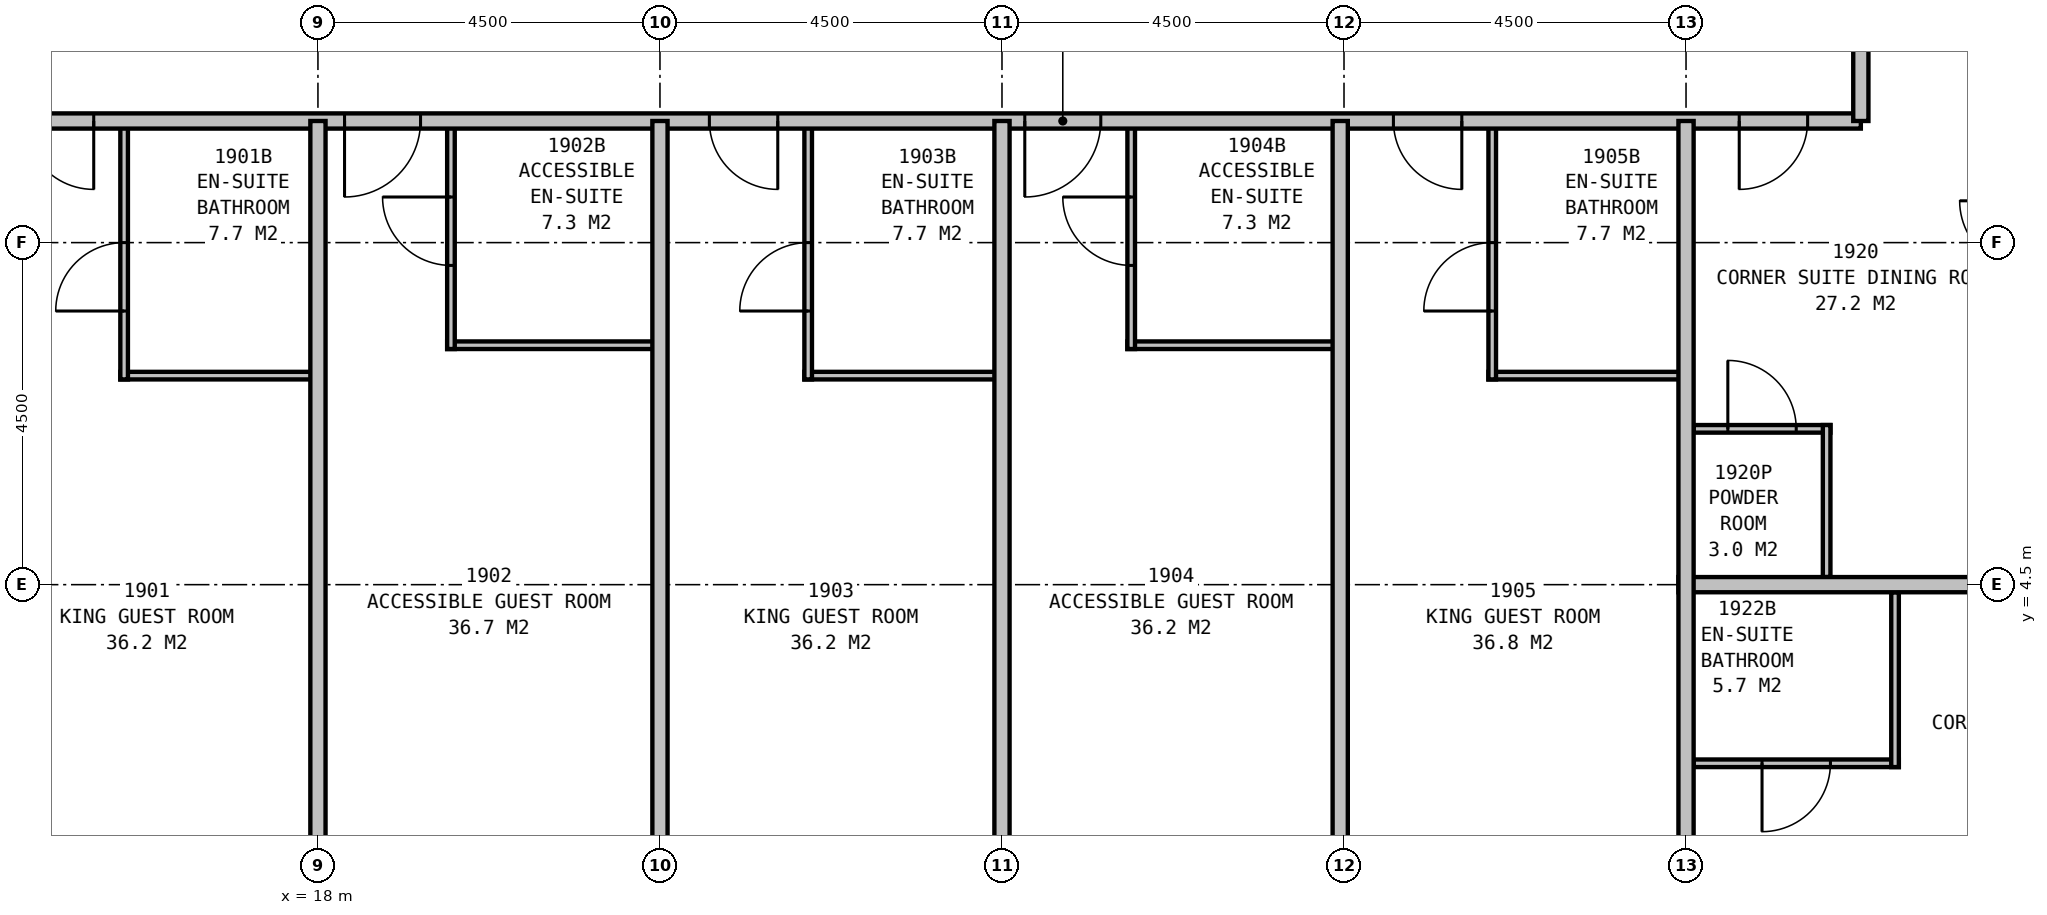
"""IFC4 building model, lengths in metres.
Left out: names, types, materials, properties, quantities, classifications, styles, units other than length and angle.
Written with IfcOpenShell. Run it as: python <this file> out.ifc"""

import sys

from ifc_helpers import new_model, si_unit, direction, frame, frame_2d, origin, place, context, subcontext, project, spatial, rectangle, extrude, element, fill, save


model = new_model("IFC4")
c1 = context("Model", 3, precision=1e-05, world=origin(), true_north=direction((0.0, 1.0)))
c2 = subcontext(c1, "Body", "Model", "MODEL_VIEW")
j1 = project(units=[si_unit("LENGTHUNIT", "METRE"), si_unit("PLANEANGLEUNIT", "RADIAN")], contexts=[c1])
p1 = place(None, origin())
s1 = spatial("IfcSite", under=j1, at=p1, CompositionType="ELEMENT")
p2 = place(p1, origin())
s2 = spatial("IfcBuilding", under=s1, at=p2, CompositionType="ELEMENT")
p3 = place(p2, frame((0.0, 0.0, 78.7)))
s3 = spatial("IfcBuildingStorey", under=s2, at=p3, CompositionType="ELEMENT", Elevation=78.7)
p4 = place(p3, frame((11.2, 10.6, 0.0), z_axis=(0.0, 0.0, 1.0), x_axis=(1.0, 0.0, 0.0)))
e1 = element("IfcWall", 1, at=p4, inside=s3, PredefinedType="PARTITIONING", context=c2, shape_type="SweptSolid", body=[
    extrude(rectangle(XDim=27.1, YDim=0.2, at=frame_2d((13.55, 0.0))), origin(), (0.0, 0.0, 1.0), 3.25),
])
p5 = place(p4, frame((3.85, 0.0, 0.0), z_axis=(0.0, 0.0, 1.0), x_axis=(-1.0, 0.0, 0.0)))
e2 = element("IfcOpeningElement", 2, at=p5, cuts=e1, PredefinedType="OPENING", context=c2, shape_type="SweptSolid", body=[
    extrude(rectangle(XDim=0.9, YDim=2.1, at=frame_2d((0.45, 1.05))), frame((0.0, 0.11, 0.0), z_axis=(0.0, -1.0, 0.0), x_axis=(1.0, 0.0, 0.0)), (0.0, 0.0, 1.0), 0.22),
])
p6 = place(p4, frame((8.15, 0.0, 0.0), z_axis=(0.0, 0.0, 1.0), x_axis=(-1.0, 0.0, 0.0)))
e3 = element("IfcOpeningElement", 3, at=p6, cuts=e1, PredefinedType="OPENING", context=c2, shape_type="SweptSolid", body=[
    extrude(rectangle(XDim=1.0, YDim=2.1, at=frame_2d((0.5, 1.05))), frame((0.0, 0.11, 0.0), z_axis=(0.0, -1.0, 0.0), x_axis=(1.0, 0.0, 0.0)), (0.0, 0.0, 1.0), 0.22),
])
p7 = place(p4, frame((12.85, 0.0, 0.0), z_axis=(0.0, 0.0, 1.0), x_axis=(-1.0, 0.0, 0.0)))
e4 = element("IfcOpeningElement", 4, at=p7, cuts=e1, PredefinedType="OPENING", context=c2, shape_type="SweptSolid", body=[
    extrude(rectangle(XDim=0.9, YDim=2.1, at=frame_2d((0.45, 1.05))), frame((0.0, 0.11, 0.0), z_axis=(0.0, -1.0, 0.0), x_axis=(1.0, 0.0, 0.0)), (0.0, 0.0, 1.0), 0.22),
])
p8 = place(p4, frame((17.1, 0.0, 0.0), z_axis=(0.0, 0.0, 1.0), x_axis=(-1.0, 0.0, 0.0)))
e5 = element("IfcOpeningElement", 5, at=p8, cuts=e1, PredefinedType="OPENING", context=c2, shape_type="SweptSolid", body=[
    extrude(rectangle(XDim=1.0, YDim=2.1, at=frame_2d((0.5, 1.05))), frame((0.0, 0.11, 0.0), z_axis=(0.0, -1.0, 0.0), x_axis=(1.0, 0.0, 0.0)), (0.0, 0.0, 1.0), 0.22),
])
p9 = place(p4, frame((21.85, 0.0, 0.0), z_axis=(0.0, 0.0, 1.0), x_axis=(-1.0, 0.0, 0.0)))
e6 = element("IfcOpeningElement", 6, at=p9, cuts=e1, PredefinedType="OPENING", context=c2, shape_type="SweptSolid", body=[
    extrude(rectangle(XDim=0.9, YDim=2.1, at=frame_2d((0.45, 1.05))), frame((0.0, 0.11, 0.0), z_axis=(0.0, -1.0, 0.0), x_axis=(1.0, 0.0, 0.0)), (0.0, 0.0, 1.0), 0.22),
])
p10 = place(p4, frame((1.6, 0.0, 0.0), z_axis=(0.0, 0.0, 1.0), x_axis=(-1.0, 0.0, 0.0)))
e7 = element("IfcOpeningElement", 7, at=p10, cuts=e1, PredefinedType="OPENING", context=c2, shape_type="SweptSolid", body=[
    extrude(rectangle(XDim=0.9, YDim=2.1, at=frame_2d((0.45, 1.05))), frame((0.0, 0.11, 0.0), z_axis=(0.0, -1.0, 0.0), x_axis=(1.0, 0.0, 0.0)), (0.0, 0.0, 1.0), 0.22),
])
p11 = place(p4, frame((26.4, 0.0, 0.0), z_axis=(0.0, 0.0, 1.0), x_axis=(-1.0, 0.0, 0.0)))
e8 = element("IfcOpeningElement", 8, at=p11, cuts=e1, PredefinedType="OPENING", context=c2, shape_type="SweptSolid", body=[
    extrude(rectangle(XDim=0.9, YDim=2.1, at=frame_2d((0.45, 1.05))), frame((0.0, 0.11, 0.0), z_axis=(0.0, -1.0, 0.0), x_axis=(1.0, 0.0, 0.0)), (0.0, 0.0, 1.0), 0.22),
])
p12 = place(p3, frame((38.3, 10.6, 0.0), z_axis=(0.0, 0.0, 1.0), x_axis=(0.0, 1.0, 0.0)))
e9 = element("IfcWall", 9, at=p12, inside=s3, PredefinedType="PARTITIONING", context=c2, shape_type="SweptSolid", body=[
    extrude(rectangle(XDim=18.7, YDim=0.2, at=frame_2d((9.35, 0.0))), origin(), (0.0, 0.0, 1.0), 3.25),
])
p13 = place(p12, frame((6.75, 0.0, 0.0), z_axis=(0.0, 0.0, 1.0), x_axis=(-1.0, 0.0, 0.0)))
e10 = element("IfcOpeningElement", 10, at=p13, cuts=e9, PredefinedType="OPENING", context=c2, shape_type="SweptSolid", body=[
    extrude(rectangle(XDim=0.9, YDim=2.1, at=frame_2d((0.45, 1.05))), frame((0.0, 0.11, 0.0), z_axis=(0.0, -1.0, 0.0), x_axis=(1.0, 0.0, 0.0)), (0.0, 0.0, 1.0), 0.22),
])
p14 = place(p12, frame((9.85, 0.0, 0.0), z_axis=(0.0, 0.0, 1.0), x_axis=(-1.0, 0.0, 0.0)))
e11 = element("IfcOpeningElement", 11, at=p14, cuts=e9, PredefinedType="OPENING", context=c2, shape_type="SweptSolid", body=[
    extrude(rectangle(XDim=1.0, YDim=2.1, at=frame_2d((0.5, 1.05))), frame((0.0, 0.11, 0.0), z_axis=(0.0, -1.0, 0.0), x_axis=(1.0, 0.0, 0.0)), (0.0, 0.0, 1.0), 0.22),
])
p15 = place(p12, frame((15.65, 0.0, 0.0), z_axis=(0.0, 0.0, 1.0), x_axis=(-1.0, 0.0, 0.0)))
e12 = element("IfcOpeningElement", 12, at=p15, cuts=e9, PredefinedType="OPENING", context=c2, shape_type="SweptSolid", body=[
    extrude(rectangle(XDim=1.0, YDim=2.1, at=frame_2d((0.5, 1.05))), frame((0.0, 0.11, 0.0), z_axis=(0.0, -1.0, 0.0), x_axis=(1.0, 0.0, 0.0)), (0.0, 0.0, 1.0), 0.22),
])
for number, where, z_axis, x_axis in (
    (13, (18.0, 10.6, 0.0), (0.0, 0.0, 1.0), (0.0, -1.0, 0.0)),
    (14, (22.5, 10.6, 0.0), (0.0, 0.0, 1.0), (0.0, -1.0, 0.0)),
    (15, (27.0, 10.6, 0.0), (0.0, 0.0, 1.0), (0.0, -1.0, 0.0)),
    (16, (31.45, 10.6, 0.0), (0.0, 0.0, 1.0), (0.0, -1.0, 0.0)),
):
    element("IfcWall", number, at=place(p3, frame(where, z_axis=z_axis, x_axis=x_axis)), inside=s3, PredefinedType="PARTITIONING", context=c2, shape_type="SweptSolid", body=[
        extrude(rectangle(XDim=10.6, YDim=0.2, at=frame_2d((5.3, 0.0))), origin(), (0.0, 0.0, 1.0), 2.25),
    ])
p16 = place(p3, frame((15.4, 7.25, 0.0), z_axis=(0.0, 0.0, 1.0), x_axis=(1.0, 0.0, 0.0)))
e17 = element("IfcWall", 17, at=p16, inside=s3, PredefinedType="PLUMBINGWALL", context=c2, shape_type="SweptSolid", body=[
    extrude(rectangle(XDim=2.6, YDim=0.1, at=frame_2d((1.3, 0.0))), origin(), (0.0, 0.0, 1.0), 3.25),
])
p17 = place(p3, frame((15.45, 10.6, 0.0), z_axis=(0.0, 0.0, 1.0), x_axis=(0.0, -1.0, 0.0)))
e18 = element("IfcWall", 18, at=p17, inside=s3, PredefinedType="PLUMBINGWALL", context=c2, shape_type="SweptSolid", body=[
    extrude(rectangle(XDim=3.4, YDim=0.1, at=frame_2d((1.7, 0.0))), origin(), (0.0, 0.0, 1.0), 3.25),
])
p18 = place(p17, frame((2.5, 0.0, 0.0), z_axis=(0.0, 0.0, 1.0), x_axis=(-1.0, 0.0, 0.0)))
e19 = element("IfcOpeningElement", 19, at=p18, cuts=e18, PredefinedType="OPENING", context=c2, shape_type="SweptSolid", body=[
    extrude(rectangle(XDim=0.9, YDim=2.1, at=frame_2d((0.45, 1.05))), frame((0.0, 0.06, 0.0), z_axis=(0.0, -1.0, 0.0), x_axis=(1.0, 0.0, 0.0)), (0.0, 0.0, 1.0), 0.12),
])
p19 = place(p3, frame((19.7, 7.65, 0.0), z_axis=(0.0, 0.0, 1.0), x_axis=(1.0, 0.0, 0.0)))
e20 = element("IfcWall", 20, at=p19, inside=s3, PredefinedType="PLUMBINGWALL", context=c2, shape_type="SweptSolid", body=[
    extrude(rectangle(XDim=2.8, YDim=0.1, at=frame_2d((1.4, 0.0))), origin(), (0.0, 0.0, 1.0), 3.25),
])
p20 = place(p3, frame((19.75, 10.6, 0.0), z_axis=(0.0, 0.0, 1.0), x_axis=(0.0, -1.0, 0.0)))
e21 = element("IfcWall", 21, at=p20, inside=s3, PredefinedType="PLUMBINGWALL", context=c2, shape_type="SweptSolid", body=[
    extrude(rectangle(XDim=3.0, YDim=0.1, at=frame_2d((1.5, 0.0))), origin(), (0.0, 0.0, 1.0), 3.25),
])
p21 = place(p20, frame((1.9, 0.0, 0.0), z_axis=(0.0, 0.0, 1.0), x_axis=(-1.0, 0.0, 0.0)))
e22 = element("IfcOpeningElement", 22, at=p21, cuts=e21, PredefinedType="OPENING", context=c2, shape_type="SweptSolid", body=[
    extrude(rectangle(XDim=0.9, YDim=2.1, at=frame_2d((0.45, 1.05))), frame((0.0, 0.06, 0.0), z_axis=(0.0, -1.0, 0.0), x_axis=(1.0, 0.0, 0.0)), (0.0, 0.0, 1.0), 0.12),
])
p22 = place(p3, frame((24.4, 7.25, 0.0), z_axis=(0.0, 0.0, 1.0), x_axis=(1.0, 0.0, 0.0)))
e23 = element("IfcWall", 23, at=p22, inside=s3, PredefinedType="PLUMBINGWALL", context=c2, shape_type="SweptSolid", body=[
    extrude(rectangle(XDim=2.6, YDim=0.1, at=frame_2d((1.3, 0.0))), origin(), (0.0, 0.0, 1.0), 3.25),
])
p23 = place(p3, frame((24.45, 10.6, 0.0), z_axis=(0.0, 0.0, 1.0), x_axis=(0.0, -1.0, 0.0)))
e24 = element("IfcWall", 24, at=p23, inside=s3, PredefinedType="PLUMBINGWALL", context=c2, shape_type="SweptSolid", body=[
    extrude(rectangle(XDim=3.4, YDim=0.1, at=frame_2d((1.7, 0.0))), origin(), (0.0, 0.0, 1.0), 3.25),
])
p24 = place(p23, frame((2.5, 0.0, 0.0), z_axis=(0.0, 0.0, 1.0), x_axis=(-1.0, 0.0, 0.0)))
e25 = element("IfcOpeningElement", 25, at=p24, cuts=e24, PredefinedType="OPENING", context=c2, shape_type="SweptSolid", body=[
    extrude(rectangle(XDim=0.9, YDim=2.1, at=frame_2d((0.45, 1.05))), frame((0.0, 0.06, 0.0), z_axis=(0.0, -1.0, 0.0), x_axis=(1.0, 0.0, 0.0)), (0.0, 0.0, 1.0), 0.12),
])
p25 = place(p3, frame((28.65, 7.65, 0.0), z_axis=(0.0, 0.0, 1.0), x_axis=(1.0, 0.0, 0.0)))
e26 = element("IfcWall", 26, at=p25, inside=s3, PredefinedType="PLUMBINGWALL", context=c2, shape_type="SweptSolid", body=[
    extrude(rectangle(XDim=2.8, YDim=0.1, at=frame_2d((1.4, 0.0))), origin(), (0.0, 0.0, 1.0), 3.25),
])
p26 = place(p3, frame((28.7, 10.6, 0.0), z_axis=(0.0, 0.0, 1.0), x_axis=(0.0, -1.0, 0.0)))
e27 = element("IfcWall", 27, at=p26, inside=s3, PredefinedType="PLUMBINGWALL", context=c2, shape_type="SweptSolid", body=[
    extrude(rectangle(XDim=3.0, YDim=0.1, at=frame_2d((1.5, 0.0))), origin(), (0.0, 0.0, 1.0), 3.25),
])
p27 = place(p26, frame((1.9, 0.0, 0.0), z_axis=(0.0, 0.0, 1.0), x_axis=(-1.0, 0.0, 0.0)))
e28 = element("IfcOpeningElement", 28, at=p27, cuts=e27, PredefinedType="OPENING", context=c2, shape_type="SweptSolid", body=[
    extrude(rectangle(XDim=0.9, YDim=2.1, at=frame_2d((0.45, 1.05))), frame((0.0, 0.06, 0.0), z_axis=(0.0, -1.0, 0.0), x_axis=(1.0, 0.0, 0.0)), (0.0, 0.0, 1.0), 0.12),
])
p28 = place(p3, frame((33.4, 7.25, 0.0), z_axis=(0.0, 0.0, 1.0), x_axis=(1.0, 0.0, 0.0)))
e29 = element("IfcWall", 29, at=p28, inside=s3, PredefinedType="PLUMBINGWALL", context=c2, shape_type="SweptSolid", body=[
    extrude(rectangle(XDim=2.6, YDim=0.1, at=frame_2d((1.3, 0.0))), origin(), (0.0, 0.0, 1.0), 3.25),
])
p29 = place(p3, frame((33.45, 10.6, 0.0), z_axis=(0.0, 0.0, 1.0), x_axis=(0.0, -1.0, 0.0)))
e30 = element("IfcWall", 30, at=p29, inside=s3, PredefinedType="PLUMBINGWALL", context=c2, shape_type="SweptSolid", body=[
    extrude(rectangle(XDim=3.4, YDim=0.1, at=frame_2d((1.7, 0.0))), origin(), (0.0, 0.0, 1.0), 3.25),
])
p30 = place(p29, frame((2.5, 0.0, 0.0), z_axis=(0.0, 0.0, 1.0), x_axis=(-1.0, 0.0, 0.0)))
e31 = element("IfcOpeningElement", 31, at=p30, cuts=e30, PredefinedType="OPENING", context=c2, shape_type="SweptSolid", body=[
    extrude(rectangle(XDim=0.9, YDim=2.1, at=frame_2d((0.45, 1.05))), frame((0.0, 0.06, 0.0), z_axis=(0.0, -1.0, 0.0), x_axis=(1.0, 0.0, 0.0)), (0.0, 0.0, 1.0), 0.12),
])
p31 = place(p3, frame((36.0, 10.6, 0.0), z_axis=(0.0, 0.0, 1.0), x_axis=(0.0, -1.0, 0.0)))
e32 = element("IfcWall", 32, at=p31, inside=s3, PredefinedType="PARTITIONING", context=c2, shape_type="SweptSolid", body=[
    extrude(rectangle(XDim=10.6, YDim=0.2, at=frame_2d((5.3, 0.0))), origin(), (0.0, 0.0, 1.0), 2.25),
])
p32 = place(p3, frame((35.9, 4.5, 0.0), z_axis=(0.0, 0.0, 1.0), x_axis=(1.0, 0.0, 0.0)))
e33 = element("IfcWall", 33, at=p32, inside=s3, PredefinedType="PARTITIONING", context=c2, shape_type="SweptSolid", body=[
    extrude(rectangle(XDim=9.1, YDim=0.2, at=frame_2d((4.55, 0.0))), origin(), (0.0, 0.0, 1.0), 3.25),
])
p33 = place(p32, frame((7.1, 0.0, 0.0)))
e34 = element("IfcOpeningElement", 34, at=p33, cuts=e33, PredefinedType="OPENING", context=c2, shape_type="SweptSolid", body=[
    extrude(rectangle(XDim=0.9, YDim=2.1, at=frame_2d((0.45, 1.05))), frame((0.0, 0.11, 0.0), z_axis=(0.0, -1.0, 0.0), x_axis=(1.0, 0.0, 0.0)), (0.0, 0.0, 1.0), 0.22),
])
p34 = place(p3, frame((37.85, 4.6, 0.0), z_axis=(0.0, 0.0, 1.0), x_axis=(0.0, 1.0, 0.0)))
e35 = element("IfcWall", 35, at=p34, inside=s3, PredefinedType="PLUMBINGWALL", context=c2, shape_type="SweptSolid", body=[
    extrude(rectangle(XDim=2.0, YDim=0.1, at=frame_2d((1.0, 0.0))), origin(), (0.0, 0.0, 1.0), 3.25),
])
p35 = place(p3, frame((36.1, 6.55, 0.0), z_axis=(0.0, 0.0, 1.0), x_axis=(1.0, 0.0, 0.0)))
e36 = element("IfcWall", 36, at=p35, inside=s3, PredefinedType="PLUMBINGWALL", context=c2, shape_type="SweptSolid", body=[
    extrude(rectangle(XDim=1.8, YDim=0.1, at=frame_2d((0.9, 0.0))), origin(), (0.0, 0.0, 1.0), 3.25),
])
p36 = place(p35, frame((0.45, 0.0, 0.0)))
e37 = element("IfcOpeningElement", 37, at=p36, cuts=e36, PredefinedType="OPENING", context=c2, shape_type="SweptSolid", body=[
    extrude(rectangle(XDim=0.9, YDim=2.1, at=frame_2d((0.45, 1.05))), frame((0.0, 0.06, 0.0), z_axis=(0.0, -1.0, 0.0), x_axis=(1.0, 0.0, 0.0)), (0.0, 0.0, 1.0), 0.12),
])
p37 = place(p3, frame((38.75, 4.4, 0.0), z_axis=(0.0, 0.0, 1.0), x_axis=(0.0, -1.0, 0.0)))
e38 = element("IfcWall", 38, at=p37, inside=s3, PredefinedType="PLUMBINGWALL", context=c2, shape_type="SweptSolid", body=[
    extrude(rectangle(XDim=2.3, YDim=0.1, at=frame_2d((1.15, 0.0))), origin(), (0.0, 0.0, 1.0), 3.25),
])
p38 = place(p3, frame((36.1, 2.15, 0.0), z_axis=(0.0, 0.0, 1.0), x_axis=(1.0, 0.0, 0.0)))
e39 = element("IfcWall", 39, at=p38, inside=s3, PredefinedType="PLUMBINGWALL", context=c2, shape_type="SweptSolid", body=[
    extrude(rectangle(XDim=2.7, YDim=0.1, at=frame_2d((1.35, 0.0))), origin(), (0.0, 0.0, 1.0), 3.25),
])
p39 = place(p38, frame((1.8, 0.0, 0.0), z_axis=(0.0, 0.0, 1.0), x_axis=(-1.0, 0.0, 0.0)))
e40 = element("IfcOpeningElement", 40, at=p39, cuts=e39, PredefinedType="OPENING", context=c2, shape_type="SweptSolid", body=[
    extrude(rectangle(XDim=0.9, YDim=2.1, at=frame_2d((0.45, 1.05))), frame((0.0, 0.06, 0.0), z_axis=(0.0, -1.0, 0.0), x_axis=(1.0, 0.0, 0.0)), (0.0, 0.0, 1.0), 0.12),
])
p40 = place(p5, origin())
e41 = element("IfcDoor", 41, at=p40, inside=s3, OperationType="SINGLE_SWING_LEFT", PredefinedType="DOOR", context=c2, shape_type="SweptSolid", body=[
    extrude(rectangle(XDim=0.9, YDim=2.1, at=frame_2d((0.45, 1.05))), frame((0.0, 0.025, 0.0), z_axis=(0.0, -1.0, 0.0), x_axis=(1.0, 0.0, 0.0)), (0.0, 0.0, 1.0), 0.05),
])
fill(e2, e41)
p41 = place(p6, origin())
e42 = element("IfcDoor", 42, at=p41, inside=s3, OperationType="SINGLE_SWING_RIGHT", PredefinedType="DOOR", context=c2, shape_type="SweptSolid", body=[
    extrude(rectangle(XDim=1.0, YDim=2.1, at=frame_2d((0.5, 1.05))), frame((0.0, 0.025, 0.0), z_axis=(0.0, -1.0, 0.0), x_axis=(1.0, 0.0, 0.0)), (0.0, 0.0, 1.0), 0.05),
])
fill(e3, e42)
p42 = place(p7, origin())
e43 = element("IfcDoor", 43, at=p42, inside=s3, OperationType="SINGLE_SWING_LEFT", PredefinedType="DOOR", context=c2, shape_type="SweptSolid", body=[
    extrude(rectangle(XDim=0.9, YDim=2.1, at=frame_2d((0.45, 1.05))), frame((0.0, 0.025, 0.0), z_axis=(0.0, -1.0, 0.0), x_axis=(1.0, 0.0, 0.0)), (0.0, 0.0, 1.0), 0.05),
])
fill(e4, e43)
p43 = place(p8, origin())
e44 = element("IfcDoor", 44, at=p43, inside=s3, OperationType="SINGLE_SWING_RIGHT", PredefinedType="DOOR", context=c2, shape_type="SweptSolid", body=[
    extrude(rectangle(XDim=1.0, YDim=2.1, at=frame_2d((0.5, 1.05))), frame((0.0, 0.025, 0.0), z_axis=(0.0, -1.0, 0.0), x_axis=(1.0, 0.0, 0.0)), (0.0, 0.0, 1.0), 0.05),
])
fill(e5, e44)
p44 = place(p9, origin())
e45 = element("IfcDoor", 45, at=p44, inside=s3, OperationType="SINGLE_SWING_LEFT", PredefinedType="DOOR", context=c2, shape_type="SweptSolid", body=[
    extrude(rectangle(XDim=0.9, YDim=2.1, at=frame_2d((0.45, 1.05))), frame((0.0, 0.025, 0.0), z_axis=(0.0, -1.0, 0.0), x_axis=(1.0, 0.0, 0.0)), (0.0, 0.0, 1.0), 0.05),
])
fill(e6, e45)
p45 = place(p11, origin())
e46 = element("IfcDoor", 46, at=p45, inside=s3, OperationType="SINGLE_SWING_RIGHT", PredefinedType="DOOR", context=c2, shape_type="SweptSolid", body=[
    extrude(rectangle(XDim=0.9, YDim=2.1, at=frame_2d((0.45, 1.05))), frame((0.0, 0.025, 0.0), z_axis=(0.0, -1.0, 0.0), x_axis=(1.0, 0.0, 0.0)), (0.0, 0.0, 1.0), 0.05),
])
fill(e8, e46)
p46 = place(p18, origin())
e47 = element("IfcDoor", 47, at=p46, inside=s3, OperationType="SINGLE_SWING_LEFT", PredefinedType="DOOR", context=c2, shape_type="SweptSolid", body=[
    extrude(rectangle(XDim=0.9, YDim=2.1, at=frame_2d((0.45, 1.05))), frame((0.0, 0.025, 0.0), z_axis=(0.0, -1.0, 0.0), x_axis=(1.0, 0.0, 0.0)), (0.0, 0.0, 1.0), 0.05),
])
fill(e19, e47)
p47 = place(p21, origin())
e48 = element("IfcDoor", 48, at=p47, inside=s3, OperationType="SINGLE_SWING_RIGHT", PredefinedType="DOOR", context=c2, shape_type="SweptSolid", body=[
    extrude(rectangle(XDim=0.9, YDim=2.1, at=frame_2d((0.45, 1.05))), frame((0.0, 0.025, 0.0), z_axis=(0.0, -1.0, 0.0), x_axis=(1.0, 0.0, 0.0)), (0.0, 0.0, 1.0), 0.05),
])
fill(e22, e48)
p48 = place(p24, origin())
e49 = element("IfcDoor", 49, at=p48, inside=s3, OperationType="SINGLE_SWING_LEFT", PredefinedType="DOOR", context=c2, shape_type="SweptSolid", body=[
    extrude(rectangle(XDim=0.9, YDim=2.1, at=frame_2d((0.45, 1.05))), frame((0.0, 0.025, 0.0), z_axis=(0.0, -1.0, 0.0), x_axis=(1.0, 0.0, 0.0)), (0.0, 0.0, 1.0), 0.05),
])
fill(e25, e49)
p49 = place(p27, origin())
e50 = element("IfcDoor", 50, at=p49, inside=s3, OperationType="SINGLE_SWING_RIGHT", PredefinedType="DOOR", context=c2, shape_type="SweptSolid", body=[
    extrude(rectangle(XDim=0.9, YDim=2.1, at=frame_2d((0.45, 1.05))), frame((0.0, 0.025, 0.0), z_axis=(0.0, -1.0, 0.0), x_axis=(1.0, 0.0, 0.0)), (0.0, 0.0, 1.0), 0.05),
])
fill(e28, e50)
p50 = place(p30, origin())
e51 = element("IfcDoor", 51, at=p50, inside=s3, OperationType="SINGLE_SWING_LEFT", PredefinedType="DOOR", context=c2, shape_type="SweptSolid", body=[
    extrude(rectangle(XDim=0.9, YDim=2.1, at=frame_2d((0.45, 1.05))), frame((0.0, 0.025, 0.0), z_axis=(0.0, -1.0, 0.0), x_axis=(1.0, 0.0, 0.0)), (0.0, 0.0, 1.0), 0.05),
])
fill(e31, e51)
p51 = place(p36, origin())
e52 = element("IfcDoor", 52, at=p51, inside=s3, OperationType="SINGLE_SWING_LEFT", PredefinedType="DOOR", context=c2, shape_type="SweptSolid", body=[
    extrude(rectangle(XDim=0.9, YDim=2.1, at=frame_2d((0.45, 1.05))), frame((0.0, 0.025, 0.0), z_axis=(0.0, -1.0, 0.0), x_axis=(1.0, 0.0, 0.0)), (0.0, 0.0, 1.0), 0.05),
])
fill(e37, e52)
p52 = place(p39, origin())
e53 = element("IfcDoor", 53, at=p52, inside=s3, OperationType="SINGLE_SWING_RIGHT", PredefinedType="DOOR", context=c2, shape_type="SweptSolid", body=[
    extrude(rectangle(XDim=0.9, YDim=2.1, at=frame_2d((0.45, 1.05))), frame((0.0, 0.025, 0.0), z_axis=(0.0, -1.0, 0.0), x_axis=(1.0, 0.0, 0.0)), (0.0, 0.0, 1.0), 0.05),
])
fill(e40, e53)
save(model, sys.argv[1])
